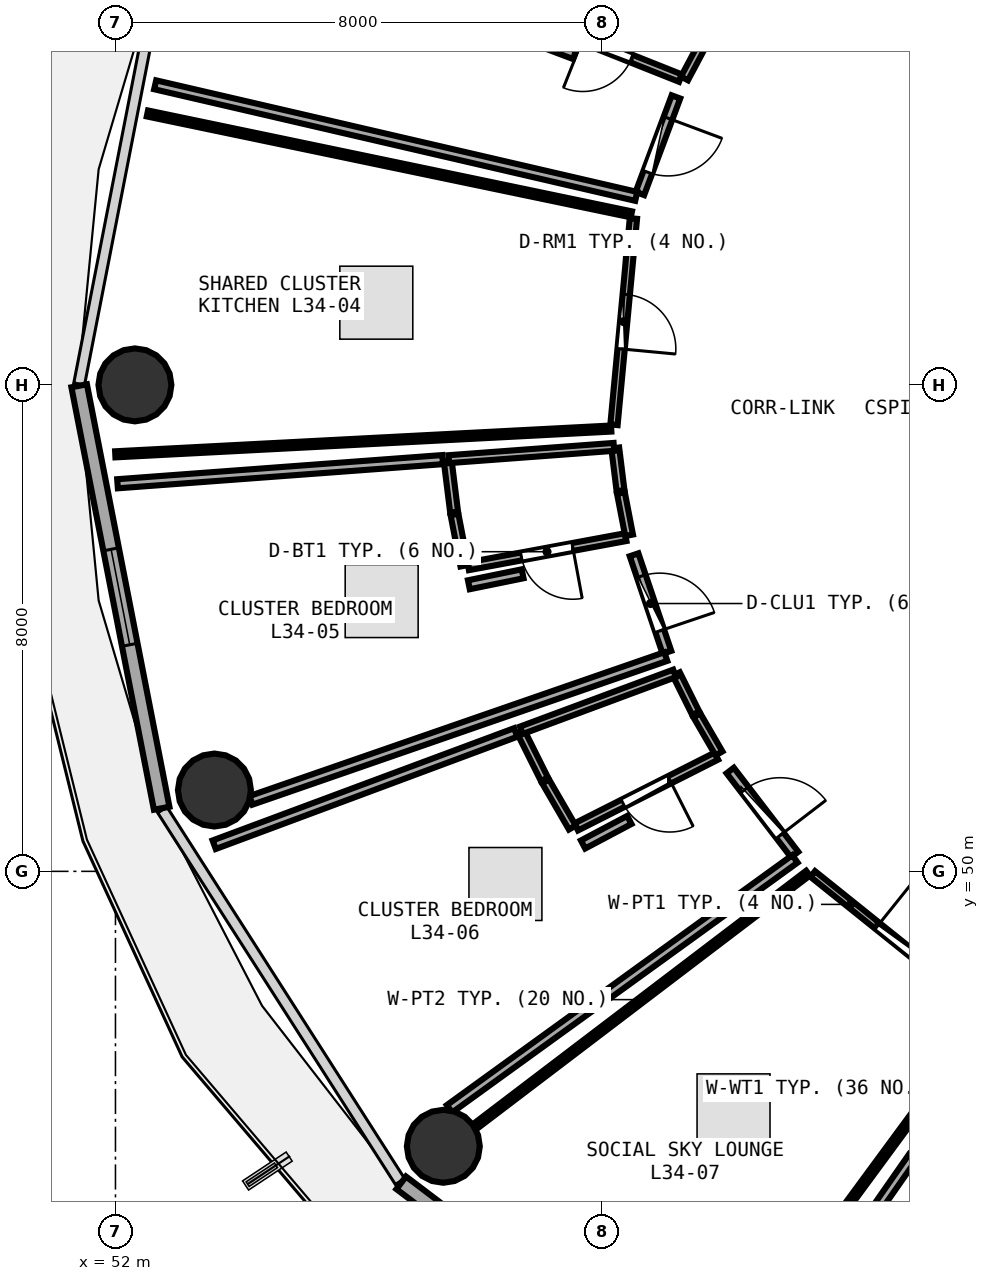
"""IFC4 building model, lengths in metres.
Left out: names, types, materials, properties, quantities, classifications, styles, units other than length and angle.
Written with IfcOpenShell. Run it as: python <this file> out.ifc"""

import sys

from ifc_helpers import new_model, si_unit, direction, frame, frame_2d, origin, origin_2d, place, context, subcontext, project, spatial, rectangle, circle, extrude, element, fill, save


model = new_model("IFC4")
c1 = context("Model", 3, precision=1e-05, world=origin(), true_north=direction((0.0, 1.0)))
c2 = subcontext(c1, "Body", "Model", "MODEL_VIEW")
j1 = project(units=[si_unit("LENGTHUNIT", "METRE"), si_unit("PLANEANGLEUNIT", "RADIAN")], contexts=[c1])
p1 = place(None, origin())
s1 = spatial("IfcSite", under=j1, at=p1, CompositionType="ELEMENT")
p2 = place(p1, origin())
s2 = spatial("IfcBuilding", under=s1, at=p2, CompositionType="ELEMENT")
p3 = place(p2, frame((0.0, 0.0, 135.6)))
s3 = spatial("IfcBuildingStorey", under=s2, at=p3, CompositionType="ELEMENT", Elevation=135.6)
for number, where, z_axis, x_axis in (
    (1, (52.32, 58.0, 0.0), (0.0, 0.0, 1.0), (1.0, 0.0, 0.0)),
    (2, (53.627, 51.337, 0.0), (0.0, 0.0, 1.0), (1.0, 0.0, 0.0)),
    (3, (57.392, 45.479, 0.0), (0.0, 0.0, 1.0), (1.0, 0.0, 0.0)),
):
    element("IfcColumn", number, at=place(p3, frame(where, z_axis=z_axis, x_axis=x_axis)), inside=s3, PredefinedType="COLUMN", context=c2, shape_type="SweptSolid", body=[
        extrude(circle(Radius=0.6, at=origin_2d()), origin(), (0.0, 0.0, 1.0), 3.75),
    ])
p4 = place(p3, frame((51.403, 57.985, 0.0), z_axis=(0.0, 0.0, 1.0), x_axis=(0.191716984769, -0.981450252306, 0.0)))
e4 = element("IfcWall", 4, at=p4, inside=s3, PredefinedType="SOLIDWALL", context=c2, shape_type="SweptSolid", body=[
    extrude(rectangle(XDim=7.079, YDim=0.26, at=frame_2d((3.54, 0.0))), origin(), (0.0, 0.0, 1.0), 3.475),
])
p5 = place(p4, frame((2.74, 0.0, 0.85)))
e5 = element("IfcOpeningElement", 5, at=p5, cuts=e4, PredefinedType="OPENING", context=c2, shape_type="SweptSolid", body=[
    extrude(rectangle(XDim=1.6, YDim=1.45, at=frame_2d((0.8, 0.725))), frame((0.0, 0.14, 0.0), z_axis=(0.0, -1.0, 0.0), x_axis=(1.0, 0.0, 0.0)), (0.0, 0.0, 1.0), 0.28),
])
p6 = place(p3, frame((56.699, 44.878, 0.0), z_axis=(0.0, 0.0, 1.0), x_axis=(0.797163719609, -0.603763202042, 0.0)))
e6 = element("IfcWall", 6, at=p6, inside=s3, PredefinedType="SOLIDWALL", context=c2, shape_type="SweptSolid", body=[
    extrude(rectangle(XDim=7.512, YDim=0.26, at=frame_2d((3.756, 0.0))), origin(), (0.0, 0.0, 1.0), 3.475),
])
p7 = place(p6, frame((2.956, 0.0, 0.85)))
e7 = element("IfcOpeningElement", 7, at=p7, cuts=e6, PredefinedType="OPENING", context=c2, shape_type="SweptSolid", body=[
    extrude(rectangle(XDim=1.6, YDim=1.45, at=frame_2d((0.8, 0.725))), frame((0.0, 0.14, 0.0), z_axis=(0.0, -1.0, 0.0), x_axis=(1.0, 0.0, 0.0)), (0.0, 0.0, 1.0), 0.28),
])
p8 = place(p3, frame((61.293, 63.044, 0.0), z_axis=(0.0, 0.0, 1.0), x_axis=(-0.929051463741, 0.369950507123, 0.0)))
e8 = element("IfcWall", 8, at=p8, inside=s3, PredefinedType="PLUMBINGWALL", context=c2, shape_type="SweptSolid", body=[
    extrude(rectangle(XDim=2.602, YDim=0.13, at=frame_2d((1.301, 0.0))), origin(), (0.0, 0.0, 1.0), 3.235),
])
p9 = place(p8, frame((0.871, 0.0, 0.0)))
e9 = element("IfcOpeningElement", 9, at=p9, cuts=e8, PredefinedType="OPENING", context=c2, shape_type="SweptSolid", body=[
    extrude(rectangle(XDim=0.86, YDim=2.05, at=frame_2d((0.43, 1.025))), frame((0.0, 0.075, 0.0), z_axis=(0.0, -1.0, 0.0), x_axis=(1.0, 0.0, 0.0)), (0.0, 0.0, 1.0), 0.15),
])
p10 = place(p3, frame((61.218, 62.736, 0.0), z_axis=(0.0, 0.0, 1.0), x_axis=(-0.349718783302, -0.93685472332, 0.0)))
e10 = element("IfcWall", 10, at=p10, inside=s3, PredefinedType="PARTITIONING", context=c2, shape_type="SweptSolid", body=[
    extrude(rectangle(XDim=1.696, YDim=0.15, at=frame_2d((0.848, 0.0))), origin(), (0.0, 0.0, 1.0), 3.235),
])
p11 = place(p10, frame((0.373, 0.0, 0.0)))
e11 = element("IfcOpeningElement", 11, at=p11, cuts=e10, PredefinedType="OPENING", context=c2, shape_type="SweptSolid", body=[
    extrude(rectangle(XDim=0.95, YDim=2.08, at=frame_2d((0.475, 1.04))), frame((0.0, 0.085, 0.0), z_axis=(0.0, -1.0, 0.0), x_axis=(1.0, 0.0, 0.0)), (0.0, 0.0, 1.0), 0.17),
])
p12 = place(p3, frame((60.518, 60.736, 0.0), z_axis=(0.0, 0.0, 1.0), x_axis=(-0.093855600535, -0.995585820634, 0.0)))
e12 = element("IfcWall", 12, at=p12, inside=s3, PredefinedType="PARTITIONING", context=c2, shape_type="SweptSolid", body=[
    extrude(rectangle(XDim=3.408, YDim=0.12, at=frame_2d((1.704, 0.0))), origin(), (0.0, 0.0, 1.0), 2.975),
])
p13 = place(p12, frame((1.254, 0.0, 0.0)))
e13 = element("IfcOpeningElement", 13, at=p13, cuts=e12, PredefinedType="OPENING", context=c2, shape_type="SweptSolid", body=[
    extrude(rectangle(XDim=0.9, YDim=2.08, at=frame_2d((0.45, 1.04))), frame((0.0, 0.07, 0.0), z_axis=(0.0, -1.0, 0.0), x_axis=(1.0, 0.0, 0.0)), (0.0, 0.0, 1.0), 0.14),
])
p14 = place(p3, frame((60.392, 55.496, 0.0), z_axis=(0.0, 0.0, 1.0), x_axis=(-0.983321304086, -0.181876916981, 0.0)))
e14 = element("IfcWall", 14, at=p14, inside=s3, PredefinedType="PLUMBINGWALL", context=c2, shape_type="SweptSolid", body=[
    extrude(rectangle(XDim=2.635, YDim=0.13, at=frame_2d((1.317, 0.0))), origin(), (0.0, 0.0, 1.0), 3.175),
])
p15 = place(p14, frame((0.887, 0.0, 0.0)))
e15 = element("IfcOpeningElement", 15, at=p15, cuts=e14, PredefinedType="OPENING", context=c2, shape_type="SweptSolid", body=[
    extrude(rectangle(XDim=0.86, YDim=2.05, at=frame_2d((0.43, 1.025))), frame((0.0, 0.075, 0.0), z_axis=(0.0, -1.0, 0.0), x_axis=(1.0, 0.0, 0.0)), (0.0, 0.0, 1.0), 0.15),
])
p16 = place(p3, frame((60.529, 55.206, 0.0), z_axis=(0.0, 0.0, 1.0), x_axis=(0.319297944841, -0.947654379202, 0.0)))
e16 = element("IfcWall", 16, at=p16, inside=s3, PredefinedType="PARTITIONING", context=c2, shape_type="SweptSolid", body=[
    extrude(rectangle(XDim=1.693, YDim=0.15, at=frame_2d((0.846, 0.0))), origin(), (0.0, 0.0, 1.0), 3.235),
])
p17 = place(p16, frame((0.371, 0.0, 0.0)))
e17 = element("IfcOpeningElement", 17, at=p17, cuts=e16, PredefinedType="OPENING", context=c2, shape_type="SweptSolid", body=[
    extrude(rectangle(XDim=0.95, YDim=2.08, at=frame_2d((0.475, 1.04))), frame((0.0, 0.085, 0.0), z_axis=(0.0, -1.0, 0.0), x_axis=(1.0, 0.0, 0.0)), (0.0, 0.0, 1.0), 0.17),
])
p18 = place(p3, frame((61.883, 51.895, 0.0), z_axis=(0.0, 0.0, 1.0), x_axis=(-0.892490597906, -0.451065995891, 0.0)))
e18 = element("IfcWall", 18, at=p18, inside=s3, PredefinedType="PLUMBINGWALL", context=c2, shape_type="SweptSolid", body=[
    extrude(rectangle(XDim=2.583, YDim=0.13, at=frame_2d((1.292, 0.0))), origin(), (0.0, 0.0, 1.0), 2.975),
])
p19 = place(p18, frame((0.861, 0.0, 0.0)))
e19 = element("IfcOpeningElement", 19, at=p19, cuts=e18, PredefinedType="OPENING", context=c2, shape_type="SweptSolid", body=[
    extrude(rectangle(XDim=0.86, YDim=2.05, at=frame_2d((0.43, 1.025))), frame((0.0, 0.075, 0.0), z_axis=(0.0, -1.0, 0.0), x_axis=(1.0, 0.0, 0.0)), (0.0, 0.0, 1.0), 0.15),
])
p20 = place(p3, frame((62.111, 51.658, 0.0), z_axis=(0.0, 0.0, 1.0), x_axis=(0.608307977949, -0.793701079729, 0.0)))
e20 = element("IfcWall", 20, at=p20, inside=s3, PredefinedType="PARTITIONING", context=c2, shape_type="SweptSolid", body=[
    extrude(rectangle(XDim=1.742, YDim=0.15, at=frame_2d((0.871, 0.0))), origin(), (0.0, 0.0, 1.0), 2.975),
])
p21 = place(p20, frame((0.396, 0.0, 0.0)))
e21 = element("IfcOpeningElement", 21, at=p21, cuts=e20, PredefinedType="OPENING", context=c2, shape_type="SweptSolid", body=[
    extrude(rectangle(XDim=0.95, YDim=2.08, at=frame_2d((0.475, 1.04))), frame((0.0, 0.085, 0.0), z_axis=(0.0, -1.0, 0.0), x_axis=(1.0, 0.0, 0.0)), (0.0, 0.0, 1.0), 0.17),
])
p22 = place(p3, frame((63.468, 49.957, 0.0), z_axis=(0.0, 0.0, 1.0), x_axis=(0.78006790059, -0.625694870099, 0.0)))
e22 = element("IfcWall", 22, at=p22, inside=s3, PredefinedType="PARTITIONING", context=c2, shape_type="SweptSolid", body=[
    extrude(rectangle(XDim=3.631, YDim=0.12, at=frame_2d((1.815, 0.0))), origin(), (0.0, 0.0, 1.0), 2.975),
])
p23 = place(p22, frame((1.366, 0.0, 0.0)))
e23 = element("IfcOpeningElement", 23, at=p23, cuts=e22, PredefinedType="OPENING", context=c2, shape_type="SweptSolid", body=[
    extrude(rectangle(XDim=0.9, YDim=2.08, at=frame_2d((0.45, 1.04))), frame((0.0, 0.07, 0.0), z_axis=(0.0, -1.0, 0.0), x_axis=(1.0, 0.0, 0.0)), (0.0, 0.0, 1.0), 0.14),
])
p24 = place(p3, frame((61.697, 63.676, 0.0), z_axis=(0.0, 0.0, 1.0), x_axis=(-0.469163481751, -0.88311133352, 0.0)))
e24 = element("IfcWall", 24, at=p24, inside=s3, PredefinedType="PLUMBINGWALL", context=c2, shape_type="SweptSolid", body=[
    extrude(rectangle(XDim=0.721, YDim=0.13, at=frame_2d((0.36, 0.0))), origin(), (0.0, 0.0, 1.0), 3.48),
])
p25 = place(p3, frame((60.565, 61.1, 0.0), z_axis=(0.0, 0.0, 1.0), x_axis=(-0.97414388338, 0.225928516292, 0.0)))
e25 = element("IfcWall", 25, at=p25, inside=s3, PredefinedType="PARTITIONING", context=c2, shape_type="SweptSolid", body=[
    extrude(rectangle(XDim=8.122, YDim=0.15, at=frame_2d((4.061, 0.0))), origin(), (0.0, 0.0, 1.0), 3.025),
])
p26 = place(p3, frame((58.688, 63.755, 0.0), z_axis=(0.0, 0.0, 1.0), x_axis=(0.935532386314, -0.353240929336, 0.0)))
e26 = element("IfcWall", 26, at=p26, inside=s3, PredefinedType="PARTITIONING", context=c2, shape_type="SweptSolid", body=[
    extrude(rectangle(XDim=0.922, YDim=0.15, at=frame_2d((0.461, 0.0))), origin(), (0.0, 0.0, 1.0), 3.48),
])
p27 = place(p3, frame((60.153, 57.282, 0.0), z_axis=(0.0, 0.0, 1.0), x_axis=(-0.998652620107, -0.051893586821, 0.0)))
e27 = element("IfcWall", 27, at=p27, inside=s3, PredefinedType="PARTITIONING", context=c2, shape_type="SweptSolid", body=[
    extrude(rectangle(XDim=8.167, YDim=0.1, at=frame_2d((4.083, 0.0))), origin(), (0.0, 0.0, 1.0), 3.025),
])
p28 = place(p3, frame((52.525, 62.464, 0.0), z_axis=(0.0, 0.0, 1.0), x_axis=(0.978946183013, -0.204118521367, 0.0)))
e28 = element("IfcWall", 28, at=p28, inside=s3, PredefinedType="PARTITIONING", context=c2, shape_type="SweptSolid", body=[
    extrude(rectangle(XDim=8.131, YDim=0.1, at=frame_2d((4.065, 0.0))), origin(), (0.0, 0.0, 1.0), 3.025),
])
p29 = place(p3, frame((60.219, 56.962, 0.0), z_axis=(0.0, 0.0, 1.0), x_axis=(0.12297181285, -0.992410163816, 0.0)))
e29 = element("IfcWall", 29, at=p29, inside=s3, PredefinedType="PLUMBINGWALL", context=c2, shape_type="SweptSolid", body=[
    extrude(rectangle(XDim=0.707, YDim=0.13, at=frame_2d((0.354, 0.0))), origin(), (0.0, 0.0, 1.0), 3.48),
])
p30 = place(p3, frame((60.313, 56.221, 0.0), z_axis=(0.0, 0.0, 1.0), x_axis=(0.190075536698, -0.981769469045, 0.0)))
e30 = element("IfcWall", 30, at=p30, inside=s3, PredefinedType="PLUMBINGWALL", context=c2, shape_type="SweptSolid", body=[
    extrude(rectangle(XDim=0.708, YDim=0.13, at=frame_2d((0.354, 0.0))), origin(), (0.0, 0.0, 1.0), 3.48),
])
p31 = place(p3, frame((57.738, 55.026, 0.0), z_axis=(0.0, 0.0, 1.0), x_axis=(-0.189438154161, 0.981892654901, 0.0)))
e31 = element("IfcWall", 31, at=p31, inside=s3, PredefinedType="PLUMBINGWALL", context=c2, shape_type="SweptSolid", body=[
    extrude(rectangle(XDim=0.858, YDim=0.13, at=frame_2d((0.429, 0.0))), origin(), (0.0, 0.0, 1.0), 3.48),
])
p32 = place(p3, frame((57.57, 55.908, 0.0), z_axis=(0.0, 0.0, 1.0), x_axis=(-0.124069838268, 0.992273488123, 0.0)))
e32 = element("IfcWall", 32, at=p32, inside=s3, PredefinedType="PLUMBINGWALL", context=c2, shape_type="SweptSolid", body=[
    extrude(rectangle(XDim=0.856, YDim=0.13, at=frame_2d((0.428, 0.0))), origin(), (0.0, 0.0, 1.0), 3.48),
])
p33 = place(p3, frame((57.481, 56.779, 0.0), z_axis=(0.0, 0.0, 1.0), x_axis=(0.997248398148, 0.074132532608, 0.0)))
e33 = element("IfcWall", 33, at=p33, inside=s3, PredefinedType="PLUMBINGWALL", context=c2, shape_type="SweptSolid", body=[
    extrude(rectangle(XDim=2.724, YDim=0.13, at=frame_2d((1.362, 0.0))), origin(), (0.0, 0.0, 1.0), 3.175),
])
p34 = place(p3, frame((61.051, 53.532, 0.0), z_axis=(0.0, 0.0, 1.0), x_axis=(-0.944870237137, -0.327445010608, 0.0)))
e34 = element("IfcWall", 34, at=p34, inside=s3, PredefinedType="PARTITIONING", context=c2, shape_type="SweptSolid", body=[
    extrude(rectangle(XDim=7.22, YDim=0.15, at=frame_2d((3.61, 0.0))), origin(), (0.0, 0.0, 1.0), 2.975),
])
p35 = place(p3, frame((52.034, 56.374, 0.0), z_axis=(0.0, 0.0, 1.0), x_axis=(0.997255565749, 0.074036049215, 0.0)))
e35 = element("IfcWall", 35, at=p35, inside=s3, PredefinedType="PARTITIONING", context=c2, shape_type="SweptSolid", body=[
    extrude(rectangle(XDim=5.362, YDim=0.15, at=frame_2d((2.681, 0.0))), origin(), (0.0, 0.0, 1.0), 3.025),
])
p36 = place(p3, frame((57.812, 54.713, 0.0), z_axis=(0.0, 0.0, 1.0), x_axis=(0.979802976843, 0.199965313418, 0.0)))
e36 = element("IfcWall", 36, at=p36, inside=s3, PredefinedType="PARTITIONING", context=c2, shape_type="SweptSolid", body=[
    extrude(rectangle(XDim=0.902, YDim=0.15, at=frame_2d((0.451, 0.0))), origin(), (0.0, 0.0, 1.0), 3.175),
])
p37 = place(p3, frame((61.223, 53.245, 0.0), z_axis=(0.0, 0.0, 1.0), x_axis=(0.445176568549, -0.895442808232, 0.0)))
e37 = element("IfcWall", 37, at=p37, inside=s3, PredefinedType="PLUMBINGWALL", context=c2, shape_type="SweptSolid", body=[
    extrude(rectangle(XDim=0.719, YDim=0.13, at=frame_2d((0.36, 0.0))), origin(), (0.0, 0.0, 1.0), 3.235),
])
p38 = place(p3, frame((61.562, 52.566, 0.0), z_axis=(0.0, 0.0, 1.0), x_axis=(0.502403748171, -0.864633144069, 0.0)))
e38 = element("IfcWall", 38, at=p38, inside=s3, PredefinedType="PLUMBINGWALL", context=c2, shape_type="SweptSolid", body=[
    extrude(rectangle(XDim=0.725, YDim=0.13, at=frame_2d((0.362, 0.0))), origin(), (0.0, 0.0, 1.0), 3.48),
])
p39 = place(p3, frame((59.514, 50.72, 0.0), z_axis=(0.0, 0.0, 1.0), x_axis=(-0.501222652689, 0.865318353227, 0.0)))
e39 = element("IfcWall", 39, at=p39, inside=s3, PredefinedType="PLUMBINGWALL", context=c2, shape_type="SweptSolid", body=[
    extrude(rectangle(XDim=0.878, YDim=0.13, at=frame_2d((0.439, 0.0))), origin(), (0.0, 0.0, 1.0), 2.975),
])
p40 = place(p3, frame((59.055, 51.515, 0.0), z_axis=(0.0, 0.0, 1.0), x_axis=(-0.446317376376, 0.894874739584, 0.0)))
e40 = element("IfcWall", 40, at=p40, inside=s3, PredefinedType="PLUMBINGWALL", context=c2, shape_type="SweptSolid", body=[
    extrude(rectangle(XDim=0.872, YDim=0.13, at=frame_2d((0.436, 0.0))), origin(), (0.0, 0.0, 1.0), 3.48),
])
p41 = place(p3, frame((58.676, 52.32, 0.0), z_axis=(0.0, 0.0, 1.0), x_axis=(0.937399857035, 0.348254946887, 0.0)))
e41 = element("IfcWall", 41, at=p41, inside=s3, PredefinedType="PLUMBINGWALL", context=c2, shape_type="SweptSolid", body=[
    extrude(rectangle(XDim=2.688, YDim=0.13, at=frame_2d((1.344, 0.0))), origin(), (0.0, 0.0, 1.0), 3.235),
])
p42 = place(p3, frame((63.175, 50.205, 0.0), z_axis=(0.0, 0.0, 1.0), x_axis=(-0.810227225477, -0.586115895618, 0.0)))
e42 = element("IfcWall", 42, at=p42, inside=s3, PredefinedType="PARTITIONING", context=c2, shape_type="SweptSolid", body=[
    extrude(rectangle(XDim=7.011, YDim=0.15, at=frame_2d((3.506, 0.0))), origin(), (0.0, 0.0, 1.0), 3.175),
])
p43 = place(p3, frame((53.624, 50.438, 0.0), z_axis=(0.0, 0.0, 1.0), x_axis=(0.937175901168, 0.348857177468, 0.0)))
e43 = element("IfcWall", 43, at=p43, inside=s3, PredefinedType="PARTITIONING", context=c2, shape_type="SweptSolid", body=[
    extrude(rectangle(XDim=5.292, YDim=0.15, at=frame_2d((2.646, 0.0))), origin(), (0.0, 0.0, 1.0), 2.975),
])
p44 = place(p3, frame((59.69, 50.442, 0.0), z_axis=(0.0, 0.0, 1.0), x_axis=(0.883456769574, 0.468512685308, 0.0)))
e44 = element("IfcWall", 44, at=p44, inside=s3, PredefinedType="PARTITIONING", context=c2, shape_type="SweptSolid", body=[
    extrude(rectangle(XDim=0.861, YDim=0.15, at=frame_2d((0.431, 0.0))), origin(), (0.0, 0.0, 1.0), 3.48),
])
p45 = place(p3, frame((66.323, 47.615, 0.0), z_axis=(0.0, 0.0, 1.0), x_axis=(-0.592678959784, -0.805438793845, 0.0)))
e45 = element("IfcWall", 45, at=p45, inside=s3, PredefinedType="PARTITIONING", context=c2, shape_type="SweptSolid", body=[
    extrude(rectangle(XDim=7.624, YDim=0.1, at=frame_2d((3.812, 0.0))), origin(), (0.0, 0.0, 1.0), 2.975),
])
p46 = place(p3, frame((57.921, 45.811, 0.0), z_axis=(0.0, 0.0, 1.0), x_axis=(0.79595600815, 0.60535446896, 0.0)))
e46 = element("IfcWall", 46, at=p46, inside=s3, PredefinedType="PARTITIONING", context=c2, shape_type="SweptSolid", body=[
    extrude(rectangle(XDim=6.869, YDim=0.1, at=frame_2d((3.435, 0.0))), origin(), (0.0, 0.0, 1.0), 2.975),
])
p47 = place(p3, frame((62.257, 41.211, 0.0), z_axis=(0.0, 0.0, 1.0), x_axis=(0.572125752908, 0.820165911789, 0.0)))
e47 = element("IfcWall", 47, at=p47, inside=s3, PredefinedType="PARTITIONING", context=c2, shape_type="SweptSolid", body=[
    extrude(rectangle(XDim=4.992, YDim=0.15, at=frame_2d((2.496, 0.0))), origin(), (0.0, 0.0, 1.0), 2.975),
])
p48 = place(p5, origin())
e48 = element("IfcWindow", 48, at=p48, inside=s3, PartitioningType="SINGLE_PANEL", PredefinedType="WINDOW", context=c2, shape_type="SweptSolid", body=[
    extrude(rectangle(XDim=1.6, YDim=1.45, at=frame_2d((0.8, 0.725))), frame((0.0, 0.03, 0.0), z_axis=(0.0, -1.0, 0.0), x_axis=(1.0, 0.0, 0.0)), (0.0, 0.0, 1.0), 0.06),
])
fill(e5, e48)
p49 = place(p9, origin())
e49 = element("IfcDoor", 49, at=p49, inside=s3, OperationType="SINGLE_SWING_RIGHT", PredefinedType="DOOR", context=c2, shape_type="SweptSolid", body=[
    extrude(rectangle(XDim=0.86, YDim=2.05, at=frame_2d((0.43, 1.025))), frame((0.0, 0.025, 0.0), z_axis=(0.0, -1.0, 0.0), x_axis=(1.0, 0.0, 0.0)), (0.0, 0.0, 1.0), 0.05),
])
fill(e9, e49)
p50 = place(p11, origin())
e50 = element("IfcDoor", 50, at=p50, inside=s3, OperationType="SINGLE_SWING_LEFT", PredefinedType="DOOR", context=c2, shape_type="SweptSolid", body=[
    extrude(rectangle(XDim=0.95, YDim=2.08, at=frame_2d((0.475, 1.04))), frame((0.0, 0.025, 0.0), z_axis=(0.0, -1.0, 0.0), x_axis=(1.0, 0.0, 0.0)), (0.0, 0.0, 1.0), 0.05),
])
fill(e11, e50)
p51 = place(p13, origin())
e51 = element("IfcDoor", 51, at=p51, inside=s3, OperationType="SINGLE_SWING_RIGHT", PredefinedType="DOOR", context=c2, shape_type="SweptSolid", body=[
    extrude(rectangle(XDim=0.9, YDim=2.08, at=frame_2d((0.45, 1.04))), frame((0.0, 0.025, 0.0), z_axis=(0.0, -1.0, 0.0), x_axis=(1.0, 0.0, 0.0)), (0.0, 0.0, 1.0), 0.05),
])
fill(e13, e51)
p52 = place(p15, origin())
e52 = element("IfcDoor", 52, at=p52, inside=s3, OperationType="SINGLE_SWING_LEFT", PredefinedType="DOOR", context=c2, shape_type="SweptSolid", body=[
    extrude(rectangle(XDim=0.86, YDim=2.05, at=frame_2d((0.43, 1.025))), frame((0.0, 0.025, 0.0), z_axis=(0.0, -1.0, 0.0), x_axis=(1.0, 0.0, 0.0)), (0.0, 0.0, 1.0), 0.05),
])
fill(e15, e52)
p53 = place(p17, origin())
e53 = element("IfcDoor", 53, at=p53, inside=s3, OperationType="SINGLE_SWING_RIGHT", PredefinedType="DOOR", context=c2, shape_type="SweptSolid", body=[
    extrude(rectangle(XDim=0.95, YDim=2.08, at=frame_2d((0.475, 1.04))), frame((0.0, 0.025, 0.0), z_axis=(0.0, -1.0, 0.0), x_axis=(1.0, 0.0, 0.0)), (0.0, 0.0, 1.0), 0.05),
])
fill(e17, e53)
p54 = place(p19, origin())
e54 = element("IfcDoor", 54, at=p54, inside=s3, OperationType="SINGLE_SWING_LEFT", PredefinedType="DOOR", context=c2, shape_type="SweptSolid", body=[
    extrude(rectangle(XDim=0.86, YDim=2.05, at=frame_2d((0.43, 1.025))), frame((0.0, 0.025, 0.0), z_axis=(0.0, -1.0, 0.0), x_axis=(1.0, 0.0, 0.0)), (0.0, 0.0, 1.0), 0.05),
])
fill(e19, e54)
p55 = place(p21, origin())
e55 = element("IfcDoor", 55, at=p55, inside=s3, OperationType="SINGLE_SWING_RIGHT", PredefinedType="DOOR", context=c2, shape_type="SweptSolid", body=[
    extrude(rectangle(XDim=0.95, YDim=2.08, at=frame_2d((0.475, 1.04))), frame((0.0, 0.025, 0.0), z_axis=(0.0, -1.0, 0.0), x_axis=(1.0, 0.0, 0.0)), (0.0, 0.0, 1.0), 0.05),
])
fill(e21, e55)
p56 = place(p23, origin())
e56 = element("IfcDoor", 56, at=p56, inside=s3, OperationType="SINGLE_SWING_LEFT", PredefinedType="DOOR", context=c2, shape_type="SweptSolid", body=[
    extrude(rectangle(XDim=0.9, YDim=2.08, at=frame_2d((0.45, 1.04))), frame((0.0, 0.025, 0.0), z_axis=(0.0, -1.0, 0.0), x_axis=(1.0, 0.0, 0.0)), (0.0, 0.0, 1.0), 0.05),
])
fill(e23, e56)
save(model, sys.argv[1])
